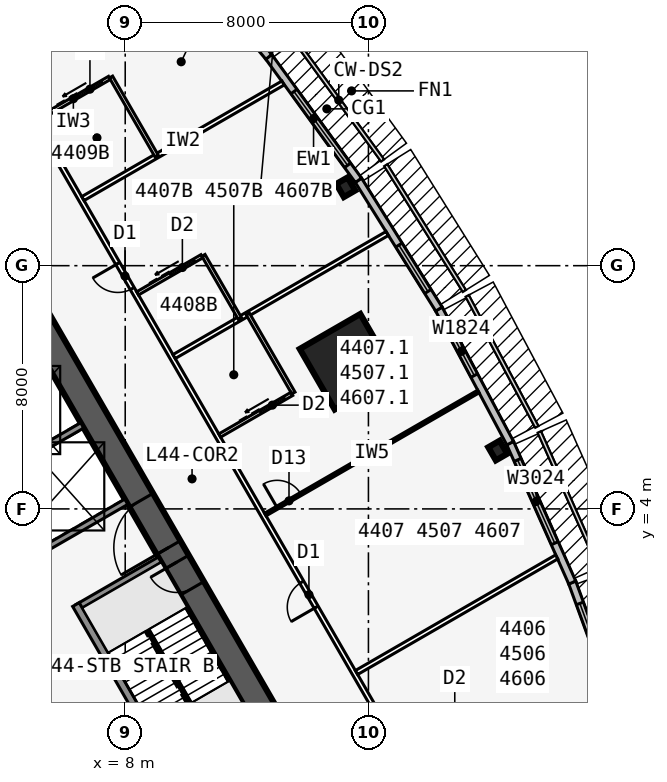
"""IFC4 building model, lengths in metres.
Left out: names, types, materials, properties, quantities, classifications, styles, units other than length and angle.
Written with IfcOpenShell. Run it as: python <this file> out.ifc"""

import sys

from ifc_helpers import new_model, si_unit, direction, frame, frame_2d, origin, origin_2d, place, context, subcontext, project, spatial, rectangle, i_section, extrude, element, fill, save


model = new_model("IFC4")
c1 = context("Model", 3, precision=1e-05, world=origin(), true_north=direction((0.0, 1.0)))
c2 = subcontext(c1, "Body", "Model", "MODEL_VIEW")
j1 = project(units=[si_unit("LENGTHUNIT", "METRE"), si_unit("PLANEANGLEUNIT", "RADIAN")], contexts=[c1])
p1 = place(None, origin())
s1 = spatial("IfcSite", under=j1, at=p1, CompositionType="ELEMENT")
p2 = place(p1, origin())
s2 = spatial("IfcBuilding", under=s1, at=p2, CompositionType="ELEMENT")
p3 = place(p2, frame((0.0, 0.0, 165.7)))
s3 = spatial("IfcBuildingStorey", under=s2, at=p3, CompositionType="ELEMENT", Elevation=165.7)
p4 = place(p3, frame((16.5, -9.526, 0.0), z_axis=(0.0, 0.0, 1.0), x_axis=(-0.499999749417, 0.866025548458, 0.0)))
e1 = element("IfcWall", 1, at=p4, inside=s3, PredefinedType="SHEAR", context=c2, shape_type="SweptSolid", body=[
    extrude(rectangle(XDim=33.0, YDim=0.9, at=frame_2d((16.5, 0.0))), origin(), (0.0, 0.0, 1.0), 3.4),
])
p5 = place(p4, frame((14.15, 0.0, 0.0)))
e2 = element("IfcOpeningElement", 2, at=p5, cuts=e1, PredefinedType="OPENING", context=c2, shape_type="SweptSolid", body=[
    extrude(rectangle(XDim=1.8, YDim=2.13, at=frame_2d((0.9, 1.065))), frame((0.0, 0.46, 0.0), z_axis=(0.0, -1.0, 0.0), x_axis=(1.0, 0.0, 0.0)), (0.0, 0.0, 1.0), 0.92),
])
p6 = place(p4, frame((12.6, 0.0, 0.0)))
e3 = element("IfcOpeningElement", 3, at=p6, cuts=e1, PredefinedType="OPENING", context=c2, shape_type="SweptSolid", body=[
    extrude(rectangle(XDim=1.0, YDim=2.13, at=frame_2d((0.5, 1.065))), frame((0.0, 0.46, 0.0), z_axis=(0.0, -1.0, 0.0), x_axis=(1.0, 0.0, 0.0)), (0.0, 0.0, 1.0), 0.92),
])
p7 = place(p3, frame((10.245, -5.843, 0.0), z_axis=(0.0, 0.0, 1.0), x_axis=(-0.499993009313, 0.866029439822, 0.0)))
e4 = element("IfcWall", 4, at=p7, inside=s3, PredefinedType="SOLIDWALL", context=c2, shape_type="SweptSolid", body=[
    extrude(rectangle(XDim=7.733, YDim=0.25, at=frame_2d((3.866, 0.0))), origin(), (0.0, 0.0, 1.0), 3.235),
])
for number, where, z_axis, x_axis in (
    (5, (6.429, 0.767, 0.0), (0.0, 0.0, 1.0), (0.866, 0.5, 0.0)),
    (6, (5.329, 2.673, 0.0), (0.0, 0.0, 1.0), (0.866, 0.5, 0.0)),
    (7, (3.879, 5.184, 0.0), (0.0, 0.0, 1.0), (0.866, 0.5, 0.0)),
):
    element("IfcWall", number, at=place(p3, frame(where, z_axis=z_axis, x_axis=x_axis)), inside=s3, PredefinedType="SOLIDWALL", context=c2, shape_type="SweptSolid", body=[
        extrude(rectangle(XDim=3.125, YDim=0.2, at=frame_2d((1.562, 0.0))), origin(), (0.0, 0.0, 1.0), 3.235),
    ])
for number, where, z_axis, x_axis in (
    (8, (20.254, 5.92, 0.0), (0.0, 0.0, 1.0), (0.866, 0.5, 0.0)),
    (9, (15.254, 14.58, 0.0), (0.0, 0.0, 1.0), (0.866, 0.5, 0.0)),
):
    element("IfcColumn", number, at=place(p3, frame(where, z_axis=z_axis, x_axis=x_axis)), inside=s3, PredefinedType="COLUMN", context=c2, shape_type="SweptSolid", body=[
        extrude(i_section(OverallWidth=0.432, OverallDepth=0.498, WebThickness=0.056, FlangeThickness=0.089, at=origin_2d()), origin(), (0.0, 0.0, 1.0), 3.4),
    ])
p8 = place(p3, frame((15.312, 8.84, 0.0), z_axis=(0.0, 0.0, 1.0), x_axis=(0.866025403784, 0.5, 0.0)))
e10 = element("IfcColumn", 10, at=p8, inside=s3, PredefinedType="COLUMN", context=c2, shape_type="SweptSolid", body=[
    extrude(rectangle(XDim=2.3, YDim=2.3, at=origin_2d()), origin(), (0.0, 0.0, 1.0), 3.4),
])
p9 = place(p3, frame((24.444, -3.183, 0.0), z_axis=(0.0, 0.0, 1.0), x_axis=(-0.343225593282, 0.939252996863, 0.0)))
e11 = element("IfcWall", 11, at=p9, inside=s3, PredefinedType="STANDARD", context=c2, shape_type="SweptSolid", body=[
    extrude(rectangle(XDim=5.076, YDim=0.25, at=frame_2d((2.538, 0.0))), origin(), (0.0, 0.0, 1.0), 3.235),
])
p10 = place(p9, frame((0.738, 0.0, 0.45)))
e12 = element("IfcOpeningElement", 12, at=p10, cuts=e11, PredefinedType="OPENING", context=c2, shape_type="SweptSolid", body=[
    extrude(rectangle(XDim=3.6, YDim=2.4, at=frame_2d((1.8, 1.2))), frame((0.0, 0.135, 0.0), z_axis=(0.0, -1.0, 0.0), x_axis=(1.0, 0.0, 0.0)), (0.0, 0.0, 1.0), 0.27),
])
p11 = place(p3, frame((22.705, 1.576, 0.0), z_axis=(0.0, 0.0, 1.0), x_axis=(-0.406832200364, 0.913502906808, 0.0)))
e13 = element("IfcWall", 13, at=p11, inside=s3, PredefinedType="STANDARD", context=c2, shape_type="SweptSolid", body=[
    extrude(rectangle(XDim=5.028, YDim=0.25, at=frame_2d((2.514, 0.0))), origin(), (0.0, 0.0, 1.0), 3.235),
])
p12 = place(p11, frame((1.418, 0.0, 0.45)))
e14 = element("IfcOpeningElement", 14, at=p12, cuts=e13, PredefinedType="OPENING", context=c2, shape_type="SweptSolid", body=[
    extrude(rectangle(XDim=3.0, YDim=2.4, at=frame_2d((1.5, 1.2))), frame((0.0, 0.135, 0.0), z_axis=(0.0, -1.0, 0.0), x_axis=(1.0, 0.0, 0.0)), (0.0, 0.0, 1.0), 0.27),
])
p13 = place(p3, frame((20.663, 6.161, 0.0), z_axis=(0.0, 0.0, 1.0), x_axis=(-0.469404966864, 0.882982999317, 0.0)))
e15 = element("IfcWall", 15, at=p13, inside=s3, PredefinedType="STANDARD", context=c2, shape_type="SweptSolid", body=[
    extrude(rectangle(XDim=5.003, YDim=0.25, at=frame_2d((2.501, 0.0))), origin(), (0.0, 0.0, 1.0), 3.235),
])
p14 = place(p13, frame((2.519, 0.0, 0.45)))
e16 = element("IfcOpeningElement", 16, at=p14, cuts=e15, PredefinedType="OPENING", context=c2, shape_type="SweptSolid", body=[
    extrude(rectangle(XDim=1.8, YDim=2.4, at=frame_2d((0.9, 1.2))), frame((0.0, 0.135, 0.0), z_axis=(0.0, -1.0, 0.0), x_axis=(1.0, 0.0, 0.0)), (0.0, 0.0, 1.0), 0.27),
])
p15 = place(p3, frame((18.319, 10.571, 0.0), z_axis=(0.0, 0.0, 1.0), x_axis=(-0.529990167382, 0.84800378683, 0.0)))
e17 = element("IfcWall", 17, at=p15, inside=s3, PredefinedType="STANDARD", context=c2, shape_type="SweptSolid", body=[
    extrude(rectangle(XDim=5.003, YDim=0.25, at=frame_2d((2.501, 0.0))), origin(), (0.0, 0.0, 1.0), 3.235),
])
p16 = place(p15, frame((0.684, 0.0, 0.45)))
e18 = element("IfcOpeningElement", 18, at=p16, cuts=e17, PredefinedType="OPENING", context=c2, shape_type="SweptSolid", body=[
    extrude(rectangle(XDim=1.8, YDim=2.4, at=frame_2d((0.9, 1.2))), frame((0.0, 0.135, 0.0), z_axis=(0.0, -1.0, 0.0), x_axis=(1.0, 0.0, 0.0)), (0.0, 0.0, 1.0), 0.27),
])
p17 = place(p3, frame((15.672, 14.807, 0.0), z_axis=(0.0, 0.0, 1.0), x_axis=(-0.587669188412, 0.809101307001, 0.0)))
e19 = element("IfcWall", 19, at=p17, inside=s3, PredefinedType="STANDARD", context=c2, shape_type="SweptSolid", body=[
    extrude(rectangle(XDim=5.028, YDim=0.25, at=frame_2d((2.514, 0.0))), origin(), (0.0, 0.0, 1.0), 3.235),
])
p18 = place(p17, frame((0.61, 0.0, 0.45)))
e20 = element("IfcOpeningElement", 20, at=p18, cuts=e19, PredefinedType="OPENING", context=c2, shape_type="SweptSolid", body=[
    extrude(rectangle(XDim=3.0, YDim=2.4, at=frame_2d((1.5, 1.2))), frame((0.0, 0.135, 0.0), z_axis=(0.0, -1.0, 0.0), x_axis=(1.0, 0.0, 0.0)), (0.0, 0.0, 1.0), 0.27),
])
p19 = place(p3, frame((12.723, 18.868, 0.0), z_axis=(0.0, 0.0, 1.0), x_axis=(-0.641810386606, 0.766863369607, 0.0)))
e21 = element("IfcWall", 21, at=p19, inside=s3, PredefinedType="STANDARD", context=c2, shape_type="SweptSolid", body=[
    extrude(rectangle(XDim=5.076, YDim=0.25, at=frame_2d((2.538, 0.0))), origin(), (0.0, 0.0, 1.0), 3.235),
])
p20 = place(p19, frame((0.738, 0.0, 0.45)))
e22 = element("IfcOpeningElement", 22, at=p20, cuts=e21, PredefinedType="OPENING", context=c2, shape_type="SweptSolid", body=[
    extrude(rectangle(XDim=3.6, YDim=2.4, at=frame_2d((1.8, 1.2))), frame((0.0, 0.135, 0.0), z_axis=(0.0, -1.0, 0.0), x_axis=(1.0, 0.0, 0.0)), (0.0, 0.0, 1.0), 0.27),
])
p21 = place(p3, frame((21.586, -11.885, 0.0), z_axis=(0.0, 0.0, 1.0), x_axis=(-0.500001915564, 0.86602429783, 0.0)))
e23 = element("IfcWall", 23, at=p21, inside=s3, PredefinedType="PARTITIONING", context=c2, shape_type="SweptSolid", body=[
    extrude(rectangle(XDim=42.172, YDim=0.15, at=frame_2d((21.086, 0.0))), origin(), (0.0, 0.0, 1.0), 3.235),
])
p22 = place(p21, frame((1.911, 0.0, 0.0)))
e24 = element("IfcOpeningElement", 24, at=p22, cuts=e23, PredefinedType="OPENING", context=c2, shape_type="SweptSolid", body=[
    extrude(rectangle(XDim=0.95, YDim=2.13, at=frame_2d((0.475, 1.065))), frame((0.0, 0.085, 0.0), z_axis=(0.0, -1.0, 0.0), x_axis=(1.0, 0.0, 0.0)), (0.0, 0.0, 1.0), 0.17),
])
p23 = place(p21, frame((9.311, 0.0, 0.0)))
e25 = element("IfcOpeningElement", 25, at=p23, cuts=e23, PredefinedType="OPENING", context=c2, shape_type="SweptSolid", body=[
    extrude(rectangle(XDim=0.95, YDim=2.13, at=frame_2d((0.475, 1.065))), frame((0.0, 0.085, 0.0), z_axis=(0.0, -1.0, 0.0), x_axis=(1.0, 0.0, 0.0)), (0.0, 0.0, 1.0), 0.17),
])
p24 = place(p21, frame((14.611, 0.0, 0.0)))
e26 = element("IfcOpeningElement", 26, at=p24, cuts=e23, PredefinedType="OPENING", context=c2, shape_type="SweptSolid", body=[
    extrude(rectangle(XDim=0.95, YDim=2.13, at=frame_2d((0.475, 1.065))), frame((0.0, 0.085, 0.0), z_axis=(0.0, -1.0, 0.0), x_axis=(1.0, 0.0, 0.0)), (0.0, 0.0, 1.0), 0.17),
])
p25 = place(p21, frame((26.711, 0.0, 0.0)))
e27 = element("IfcOpeningElement", 27, at=p25, cuts=e23, PredefinedType="OPENING", context=c2, shape_type="SweptSolid", body=[
    extrude(rectangle(XDim=0.95, YDim=2.13, at=frame_2d((0.475, 1.065))), frame((0.0, 0.085, 0.0), z_axis=(0.0, -1.0, 0.0), x_axis=(1.0, 0.0, 0.0)), (0.0, 0.0, 1.0), 0.17),
])
p26 = place(p21, frame((38.884, 0.0, 0.0)))
e28 = element("IfcOpeningElement", 28, at=p26, cuts=e23, PredefinedType="OPENING", context=c2, shape_type="SweptSolid", body=[
    extrude(rectangle(XDim=0.95, YDim=2.13, at=frame_2d((0.475, 1.065))), frame((0.0, 0.085, 0.0), z_axis=(0.0, -1.0, 0.0), x_axis=(1.0, 0.0, 0.0)), (0.0, 0.0, 1.0), 0.17),
])
p27 = place(p3, frame((15.608, -1.381, 0.0), z_axis=(0.0, 0.0, 1.0), x_axis=(0.866025154315, 0.500000432093, 0.0)))
e29 = element("IfcWall", 29, at=p27, inside=s3, PredefinedType="PARTITIONING", context=c2, shape_type="SweptSolid", body=[
    extrude(rectangle(XDim=7.603, YDim=0.15, at=frame_2d((3.801, 0.0))), origin(), (0.0, 0.0, 1.0), 3.235),
])
p28 = place(p3, frame((12.608, 3.815, 0.0), z_axis=(0.0, 0.0, 1.0), x_axis=(0.866021827868, 0.500006193617, 0.0)))
e30 = element("IfcWall", 30, at=p28, inside=s3, PredefinedType="PARTITIONING", context=c2, shape_type="SweptSolid", body=[
    extrude(rectangle(XDim=8.094, YDim=0.1, at=frame_2d((4.047, 0.0))), origin(), (0.0, 0.0, 1.0), 3.235),
])
p29 = place(p28, frame((0.45, 0.0, 0.0)))
e31 = element("IfcOpeningElement", 31, at=p29, cuts=e30, PredefinedType="OPENING", context=c2, shape_type="SweptSolid", body=[
    extrude(rectangle(XDim=0.9, YDim=2.13, at=frame_2d((0.45, 1.065))), frame((0.0, 0.06, 0.0), z_axis=(0.0, -1.0, 0.0), x_axis=(1.0, 0.0, 0.0)), (0.0, 0.0, 1.0), 0.12),
])
p30 = place(p3, frame((9.608, 9.011, 0.0), z_axis=(0.0, 0.0, 1.0), x_axis=(0.866021827868, 0.500006193617, 0.0)))
e32 = element("IfcWall", 32, at=p30, inside=s3, PredefinedType="PARTITIONING", context=c2, shape_type="SweptSolid", body=[
    extrude(rectangle(XDim=8.094, YDim=0.15, at=frame_2d((4.047, 0.0))), origin(), (0.0, 0.0, 1.0), 3.235),
])
p31 = place(p3, frame((6.608, 14.208, 0.0), z_axis=(0.0, 0.0, 1.0), x_axis=(0.866025154315, 0.500000432093, 0.0)))
e33 = element("IfcWall", 33, at=p31, inside=s3, PredefinedType="PARTITIONING", context=c2, shape_type="SweptSolid", body=[
    extrude(rectangle(XDim=7.603, YDim=0.15, at=frame_2d((3.801, 0.0))), origin(), (0.0, 0.0, 1.0), 3.235),
])
p32 = place(p3, frame((13.533, 7.813, 0.0), z_axis=(0.0, 0.0, 1.0), x_axis=(-0.499990139034, 0.866031096941, 0.0)))
e34 = element("IfcWall", 34, at=p32, inside=s3, PredefinedType="PLUMBINGWALL", context=c2, shape_type="SweptSolid", body=[
    extrude(rectangle(XDim=3.0, YDim=0.12, at=frame_2d((1.5, 0.0))), origin(), (0.0, 0.0, 1.0), 3.235),
])
p33 = place(p3, frame((11.108, 6.413, 0.0), z_axis=(0.0, 0.0, 1.0), x_axis=(0.865997131366, 0.500048966069, 0.0)))
e35 = element("IfcWall", 35, at=p33, inside=s3, PredefinedType="PLUMBINGWALL", context=c2, shape_type="SweptSolid", body=[
    extrude(rectangle(XDim=2.74, YDim=0.12, at=frame_2d((1.37, 0.0))), origin(), (0.0, 0.0, 1.0), 2.389),
])
p34 = place(p33, frame((1.55, 0.0, 0.0)))
e36 = element("IfcOpeningElement", 36, at=p34, cuts=e35, PredefinedType="OPENING", context=c2, shape_type="SweptSolid", body=[
    extrude(rectangle(XDim=0.9, YDim=2.13, at=frame_2d((0.45, 1.065))), frame((0.0, 0.07, 0.0), z_axis=(0.0, -1.0, 0.0), x_axis=(1.0, 0.0, 0.0)), (0.0, 0.0, 1.0), 0.14),
])
p35 = place(p3, frame((11.773, 10.261, 0.0), z_axis=(0.0, 0.0, 1.0), x_axis=(-0.500001309137, 0.866024647952, 0.0)))
e37 = element("IfcWall", 37, at=p35, inside=s3, PredefinedType="PLUMBINGWALL", context=c2, shape_type="SweptSolid", body=[
    extrude(rectangle(XDim=2.4, YDim=0.12, at=frame_2d((1.2, 0.0))), origin(), (0.0, 0.0, 1.0), 3.235),
])
p36 = place(p3, frame((8.408, 11.09, 0.0), z_axis=(0.0, 0.0, 1.0), x_axis=(0.865980627057, 0.500077547548, 0.0)))
e38 = element("IfcWall", 38, at=p36, inside=s3, PredefinedType="PLUMBINGWALL", context=c2, shape_type="SweptSolid", body=[
    extrude(rectangle(XDim=2.44, YDim=0.12, at=frame_2d((1.22, 0.0))), origin(), (0.0, 0.0, 1.0), 3.235),
])
p37 = place(p36, frame((1.25, 0.0, 0.0)))
e39 = element("IfcOpeningElement", 39, at=p37, cuts=e38, PredefinedType="OPENING", context=c2, shape_type="SweptSolid", body=[
    extrude(rectangle(XDim=0.9, YDim=2.13, at=frame_2d((0.45, 1.065))), frame((0.0, 0.07, 0.0), z_axis=(0.0, -1.0, 0.0), x_axis=(1.0, 0.0, 0.0)), (0.0, 0.0, 1.0), 0.14),
])
p38 = place(p3, frame((9.033, 15.607, 0.0), z_axis=(0.0, 0.0, 1.0), x_axis=(-0.50002537861, 0.866010750942, 0.0)))
e40 = element("IfcWall", 40, at=p38, inside=s3, PredefinedType="PLUMBINGWALL", context=c2, shape_type="SweptSolid", body=[
    extrude(rectangle(XDim=3.0, YDim=0.12, at=frame_2d((1.5, 0.0))), origin(), (0.0, 0.0, 1.0), 3.235),
])
p39 = place(p3, frame((5.108, 16.805, 0.0), z_axis=(0.0, 0.0, 1.0), x_axis=(0.866035715982, 0.499982138324, 0.0)))
e41 = element("IfcWall", 41, at=p39, inside=s3, PredefinedType="PLUMBINGWALL", context=c2, shape_type="SweptSolid", body=[
    extrude(rectangle(XDim=2.74, YDim=0.12, at=frame_2d((1.37, 0.0))), origin(), (0.0, 0.0, 1.0), 3.235),
])
p40 = place(p39, frame((1.55, 0.0, 0.0)))
e42 = element("IfcOpeningElement", 42, at=p40, cuts=e41, PredefinedType="OPENING", context=c2, shape_type="SweptSolid", body=[
    extrude(rectangle(XDim=0.9, YDim=2.13, at=frame_2d((0.45, 1.065))), frame((0.0, 0.07, 0.0), z_axis=(0.0, -1.0, 0.0), x_axis=(1.0, 0.0, 0.0)), (0.0, 0.0, 1.0), 0.14),
])
p41 = place(p3, frame((10.135, -2.401, 0.0), z_axis=(0.0, 0.0, 1.0), x_axis=(-0.499992232847, 0.866029888106, 0.0)))
e43 = element("IfcWall", 43, at=p41, inside=s3, PredefinedType="SOLIDWALL", context=c2, shape_type="SweptSolid", body=[
    extrude(rectangle(XDim=2.794, YDim=0.1, at=frame_2d((1.397, 0.0))), origin(), (0.0, 0.0, 1.0), 3.4),
])
p42 = place(p10, origin())
e44 = element("IfcWindow", 44, at=p42, inside=s3, PartitioningType="SINGLE_PANEL", PredefinedType="WINDOW", context=c2, shape_type="SweptSolid", body=[
    extrude(rectangle(XDim=3.6, YDim=2.4, at=frame_2d((1.8, 1.2))), frame((0.0, 0.03, 0.0), z_axis=(0.0, -1.0, 0.0), x_axis=(1.0, 0.0, 0.0)), (0.0, 0.0, 1.0), 0.06),
])
fill(e12, e44)
p43 = place(p12, origin())
e45 = element("IfcWindow", 45, at=p43, inside=s3, PartitioningType="SINGLE_PANEL", PredefinedType="WINDOW", context=c2, shape_type="SweptSolid", body=[
    extrude(rectangle(XDim=3.0, YDim=2.4, at=frame_2d((1.5, 1.2))), frame((0.0, 0.03, 0.0), z_axis=(0.0, -1.0, 0.0), x_axis=(1.0, 0.0, 0.0)), (0.0, 0.0, 1.0), 0.06),
])
fill(e14, e45)
p44 = place(p14, origin())
e46 = element("IfcWindow", 46, at=p44, inside=s3, PartitioningType="SINGLE_PANEL", PredefinedType="WINDOW", context=c2, shape_type="SweptSolid", body=[
    extrude(rectangle(XDim=1.8, YDim=2.4, at=frame_2d((0.9, 1.2))), frame((0.0, 0.03, 0.0), z_axis=(0.0, -1.0, 0.0), x_axis=(1.0, 0.0, 0.0)), (0.0, 0.0, 1.0), 0.06),
])
fill(e16, e46)
p45 = place(p16, origin())
e47 = element("IfcWindow", 47, at=p45, inside=s3, PartitioningType="SINGLE_PANEL", PredefinedType="WINDOW", context=c2, shape_type="SweptSolid", body=[
    extrude(rectangle(XDim=1.8, YDim=2.4, at=frame_2d((0.9, 1.2))), frame((0.0, 0.03, 0.0), z_axis=(0.0, -1.0, 0.0), x_axis=(1.0, 0.0, 0.0)), (0.0, 0.0, 1.0), 0.06),
])
fill(e18, e47)
p46 = place(p18, origin())
e48 = element("IfcWindow", 48, at=p46, inside=s3, PartitioningType="SINGLE_PANEL", PredefinedType="WINDOW", context=c2, shape_type="SweptSolid", body=[
    extrude(rectangle(XDim=3.0, YDim=2.4, at=frame_2d((1.5, 1.2))), frame((0.0, 0.03, 0.0), z_axis=(0.0, -1.0, 0.0), x_axis=(1.0, 0.0, 0.0)), (0.0, 0.0, 1.0), 0.06),
])
fill(e20, e48)
p47 = place(p29, origin())
e49 = element("IfcDoor", 49, at=p47, inside=s3, OperationType="SINGLE_SWING_LEFT", PredefinedType="DOOR", context=c2, shape_type="SweptSolid", body=[
    extrude(rectangle(XDim=0.9, YDim=2.13, at=frame_2d((0.45, 1.065))), frame((0.0, 0.025, 0.0), z_axis=(0.0, -1.0, 0.0), x_axis=(1.0, 0.0, 0.0)), (0.0, 0.0, 1.0), 0.05),
])
fill(e31, e49)
p48 = place(p24, origin())
e50 = element("IfcDoor", 50, at=p48, inside=s3, OperationType="SINGLE_SWING_LEFT", PredefinedType="DOOR", context=c2, shape_type="SweptSolid", body=[
    extrude(rectangle(XDim=0.95, YDim=2.13, at=frame_2d((0.475, 1.065))), frame((0.0, 0.025, 0.0), z_axis=(0.0, -1.0, 0.0), x_axis=(1.0, 0.0, 0.0)), (0.0, 0.0, 1.0), 0.05),
])
fill(e26, e50)
p49 = place(p34, origin())
e51 = element("IfcDoor", 51, at=p49, inside=s3, OperationType="SLIDING_TO_LEFT", PredefinedType="DOOR", context=c2, shape_type="SweptSolid", body=[
    extrude(rectangle(XDim=0.9, YDim=2.13, at=frame_2d((0.45, 1.065))), frame((0.0, 0.025, 0.0), z_axis=(0.0, -1.0, 0.0), x_axis=(1.0, 0.0, 0.0)), (0.0, 0.0, 1.0), 0.05),
])
fill(e36, e51)
p50 = place(p37, origin())
e52 = element("IfcDoor", 52, at=p50, inside=s3, OperationType="SLIDING_TO_LEFT", PredefinedType="DOOR", context=c2, shape_type="SweptSolid", body=[
    extrude(rectangle(XDim=0.9, YDim=2.13, at=frame_2d((0.45, 1.065))), frame((0.0, 0.025, 0.0), z_axis=(0.0, -1.0, 0.0), x_axis=(1.0, 0.0, 0.0)), (0.0, 0.0, 1.0), 0.05),
])
fill(e39, e52)
p51 = place(p25, origin())
e53 = element("IfcDoor", 53, at=p51, inside=s3, OperationType="SINGLE_SWING_RIGHT", PredefinedType="DOOR", context=c2, shape_type="SweptSolid", body=[
    extrude(rectangle(XDim=0.95, YDim=2.13, at=frame_2d((0.475, 1.065))), frame((0.0, 0.025, 0.0), z_axis=(0.0, -1.0, 0.0), x_axis=(1.0, 0.0, 0.0)), (0.0, 0.0, 1.0), 0.05),
])
fill(e27, e53)
p52 = place(p40, origin())
e54 = element("IfcDoor", 54, at=p52, inside=s3, OperationType="SLIDING_TO_LEFT", PredefinedType="DOOR", context=c2, shape_type="SweptSolid", body=[
    extrude(rectangle(XDim=0.9, YDim=2.13, at=frame_2d((0.45, 1.065))), frame((0.0, 0.025, 0.0), z_axis=(0.0, -1.0, 0.0), x_axis=(1.0, 0.0, 0.0)), (0.0, 0.0, 1.0), 0.05),
])
fill(e42, e54)
p53 = place(p5, origin())
e55 = element("IfcDoor", 55, at=p53, inside=s3, OperationType="DOUBLE_DOOR_SINGLE_SWING", PredefinedType="DOOR", context=c2, shape_type="SweptSolid", body=[
    extrude(rectangle(XDim=1.8, YDim=2.13, at=frame_2d((0.9, 1.065))), frame((0.0, 0.025, 0.0), z_axis=(0.0, -1.0, 0.0), x_axis=(1.0, 0.0, 0.0)), (0.0, 0.0, 1.0), 0.05),
])
fill(e2, e55)
p54 = place(p6, origin())
e56 = element("IfcDoor", 56, at=p54, inside=s3, OperationType="SINGLE_SWING_RIGHT", PredefinedType="DOOR", context=c2, shape_type="SweptSolid", body=[
    extrude(rectangle(XDim=1.0, YDim=2.13, at=frame_2d((0.5, 1.065))), frame((0.0, 0.025, 0.0), z_axis=(0.0, -1.0, 0.0), x_axis=(1.0, 0.0, 0.0)), (0.0, 0.0, 1.0), 0.05),
])
fill(e3, e56)
save(model, sys.argv[1])
